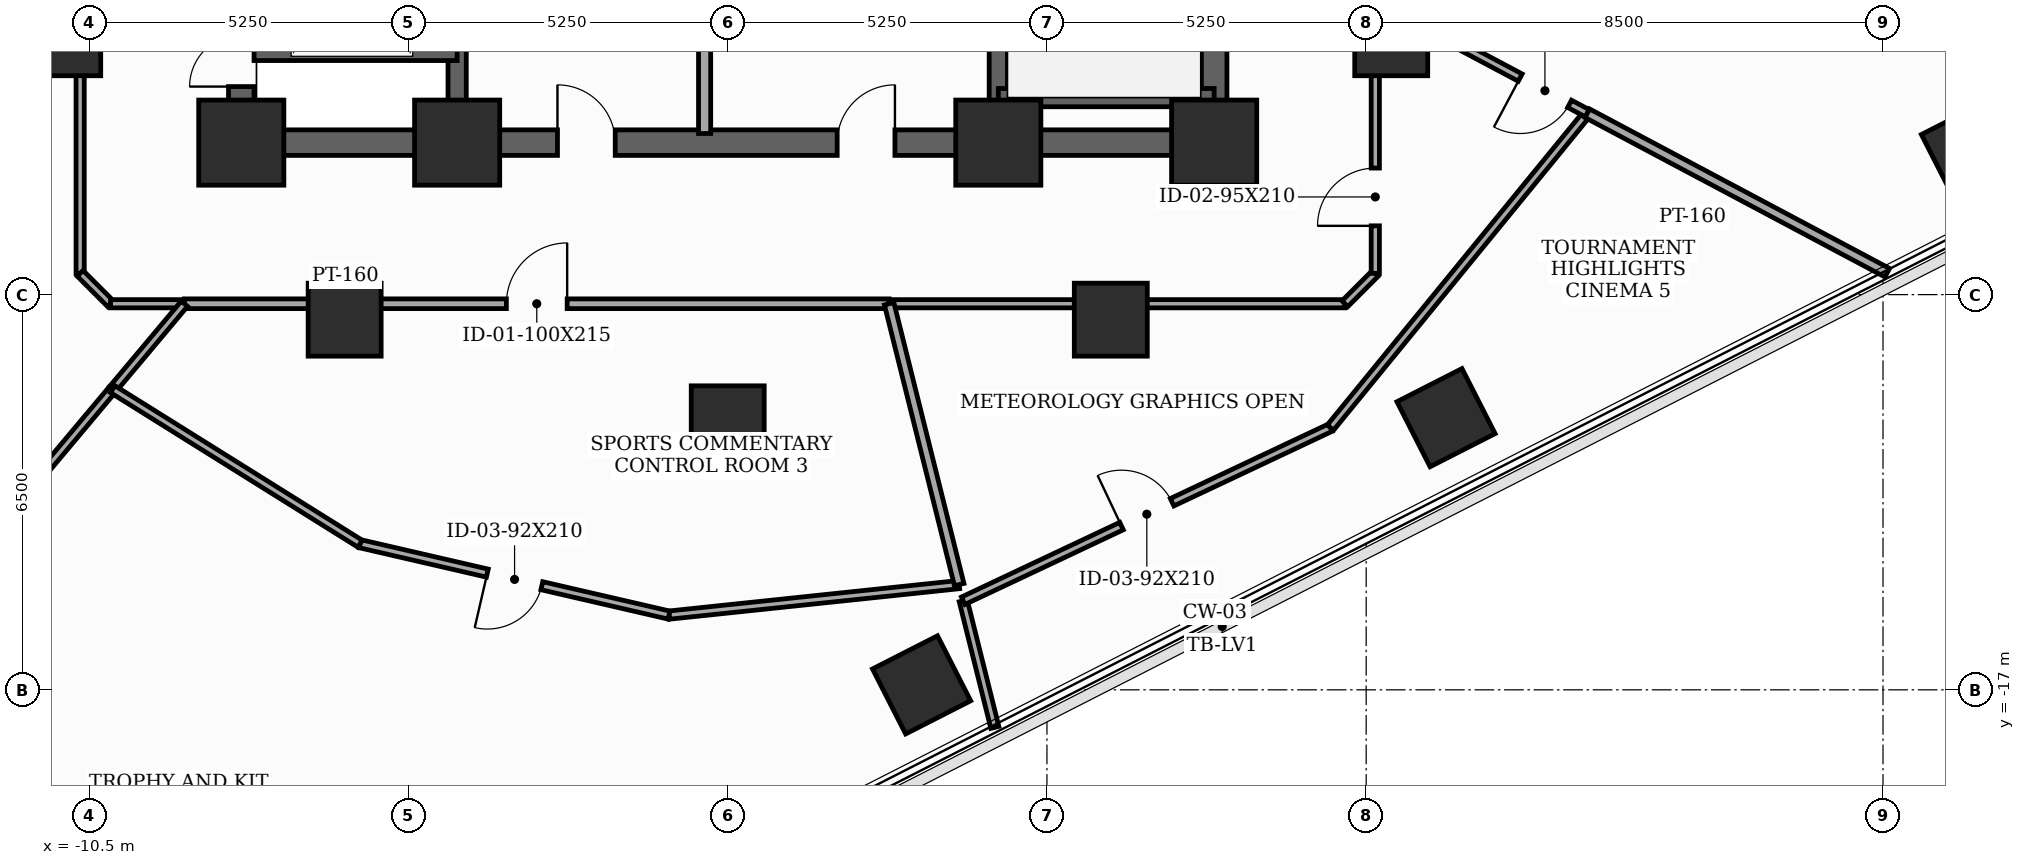
"""IFC4 building model, lengths in metres.
Left out: names, types, materials, properties, quantities, classifications, styles, units other than length and angle.
Written with IfcOpenShell. Run it as: python <this file> out.ifc"""

import sys

from ifc_helpers import new_model, si_unit, direction, frame, frame_2d, origin, origin_2d, place, context, subcontext, project, spatial, rectangle, extrude, element, fill, save


model = new_model("IFC4")
c1 = context("Model", 3, precision=1e-05, world=origin(), true_north=direction((0.0, 1.0)))
c2 = subcontext(c1, "Body", "Model", "MODEL_VIEW")
j1 = project(units=[si_unit("LENGTHUNIT", "METRE"), si_unit("PLANEANGLEUNIT", "RADIAN")], contexts=[c1])
p1 = place(None, origin())
s1 = spatial("IfcSite", under=j1, at=p1, CompositionType="ELEMENT")
p2 = place(p1, origin())
s2 = spatial("IfcBuilding", under=s1, at=p2, CompositionType="ELEMENT")
p3 = place(p2, frame((0.0, 0.0, 127.3)))
s3 = spatial("IfcBuildingStorey", under=s2, at=p3, CompositionType="ELEMENT", Elevation=127.3)
for number, where, z_axis, x_axis in (
    (1, (-8.0, -8.0, 0.0), (0.0, 0.0, 1.0), (1.0, 0.0, 0.0)),
    (2, (-4.45, -8.0, 0.0), (0.0, 0.0, 1.0), (1.0, 0.0, 0.0)),
    (3, (4.45, -8.0, 0.0), (0.0, 0.0, 1.0), (1.0, 0.0, 0.0)),
    (4, (8.0, -8.0, 0.0), (0.0, 0.0, 1.0), (1.0, 0.0, 0.0)),
):
    element("IfcColumn", number, at=place(p3, frame(where, z_axis=z_axis, x_axis=x_axis)), inside=s3, PredefinedType="COLUMN", context=c2, shape_type="SweptSolid", body=[
        extrude(rectangle(XDim=1.4, YDim=1.4, at=origin_2d()), origin(), (0.0, 0.0, 1.0), 3.7),
    ])
for number, where, z_axis, x_axis in (
    (5, (-10.912, -6.3, 0.0), (0.0, 0.0, 1.0), (1.0, 0.0, 0.0)),
    (6, (-6.3, -10.912, 0.0), (0.0, 0.0, 1.0), (1.0, 0.0, 0.0)),
    (7, (0.0, -12.6, 0.0), (0.0, 0.0, 1.0), (1.0, 0.0, 0.0)),
    (8, (6.3, -10.912, 0.0), (0.0, 0.0, 1.0), (1.0, 0.0, 0.0)),
    (9, (10.912, -6.3, 0.0), (0.0, 0.0, 1.0), (1.0, 0.0, 0.0)),
    (10, (3.188, -16.918, 0.0), (0.0, 0.0, 1.0), (0.891, 0.454, 0.0)),
    (11, (11.813, -12.524, 0.0), (0.0, 0.0, 1.0), (0.891, 0.454, 0.0)),
    (12, (20.438, -8.129, 0.0), (0.0, 0.0, 1.0), (0.891, 0.454, 0.0)),
):
    element("IfcColumn", number, at=place(p3, frame(where, z_axis=z_axis, x_axis=x_axis)), inside=s3, PredefinedType="COLUMN", context=c2, shape_type="SweptSolid", body=[
        extrude(rectangle(XDim=1.2, YDim=1.2, at=origin_2d()), origin(), (0.0, 0.0, 1.0), 3.7),
    ])
p4 = place(p3, frame((-8.0, -8.0, 0.0), z_axis=(0.0, 0.0, 1.0), x_axis=(0.0, 1.0, 0.0)))
e13 = element("IfcWall", 13, at=p4, inside=s3, PredefinedType="SHEAR", context=c2, shape_type="SweptSolid", body=[
    extrude(rectangle(XDim=16.0, YDim=0.42, at=frame_2d((8.0, 0.0))), origin(), (0.0, 0.0, 1.0), 3.5),
])
p5 = place(p4, frame((0.922, 0.0, 0.0)))
e14 = element("IfcOpeningElement", 14, at=p5, cuts=e13, PredefinedType="OPENING", context=c2, shape_type="SweptSolid", body=[
    extrude(rectangle(XDim=0.85, YDim=2.02, at=frame_2d((0.425, 1.01))), frame((0.0, 0.22, 0.0), z_axis=(0.0, -1.0, 0.0), x_axis=(1.0, 0.0, 0.0)), (0.0, 0.0, 1.0), 0.44),
])
p6 = place(p4, frame((5.35, 0.0, 0.0)))
e15 = element("IfcOpeningElement", 15, at=p6, cuts=e13, PredefinedType="OPENING", context=c2, shape_type="SweptSolid", body=[
    extrude(rectangle(XDim=1.05, YDim=2.15, at=frame_2d((0.525, 1.075))), frame((0.0, 0.22, 0.0), z_axis=(0.0, -1.0, 0.0), x_axis=(1.0, 0.0, 0.0)), (0.0, 0.0, 1.0), 0.44),
])
p7 = place(p3, frame((8.0, -8.0, 0.0), z_axis=(0.0, 0.0, 1.0), x_axis=(0.0, 1.0, 0.0)))
e16 = element("IfcWall", 16, at=p7, inside=s3, PredefinedType="SHEAR", context=c2, shape_type="SweptSolid", body=[
    extrude(rectangle(XDim=16.0, YDim=0.42, at=frame_2d((8.0, 0.0))), origin(), (0.0, 0.0, 1.0), 3.5),
])
p8 = place(p7, frame((9.6, 0.0, 0.0)))
e17 = element("IfcOpeningElement", 17, at=p8, cuts=e16, PredefinedType="OPENING", context=c2, shape_type="SweptSolid", body=[
    extrude(rectangle(XDim=1.05, YDim=2.15, at=frame_2d((0.525, 1.075))), frame((0.0, 0.22, 0.0), z_axis=(0.0, -1.0, 0.0), x_axis=(1.0, 0.0, 0.0)), (0.0, 0.0, 1.0), 0.44),
])
p9 = place(p7, frame((14.229, 0.0, 0.0)))
e18 = element("IfcOpeningElement", 18, at=p9, cuts=e16, PredefinedType="OPENING", context=c2, shape_type="SweptSolid", body=[
    extrude(rectangle(XDim=0.85, YDim=2.02, at=frame_2d((0.425, 1.01))), frame((0.0, 0.22, 0.0), z_axis=(0.0, -1.0, 0.0), x_axis=(1.0, 0.0, 0.0)), (0.0, 0.0, 1.0), 0.44),
])
p10 = place(p3, frame((-8.0, -8.0, 0.0), z_axis=(0.0, 0.0, 1.0), x_axis=(1.0, 0.0, 0.0)))
e19 = element("IfcWall", 19, at=p10, inside=s3, PredefinedType="SHEAR", context=c2, shape_type="SweptSolid", body=[
    extrude(rectangle(XDim=16.0, YDim=0.42, at=frame_2d((8.0, 0.0))), origin(), (0.0, 0.0, 1.0), 3.5),
])
p11 = place(p10, frame((5.2, 0.0, 0.0)))
e20 = element("IfcOpeningElement", 20, at=p11, cuts=e19, PredefinedType="OPENING", context=c2, shape_type="SweptSolid", body=[
    extrude(rectangle(XDim=0.95, YDim=2.1, at=frame_2d((0.475, 1.05))), frame((0.0, 0.22, 0.0), z_axis=(0.0, -1.0, 0.0), x_axis=(1.0, 0.0, 0.0)), (0.0, 0.0, 1.0), 0.44),
])
p12 = place(p10, frame((9.8, 0.0, 0.0)))
e21 = element("IfcOpeningElement", 21, at=p12, cuts=e19, PredefinedType="OPENING", context=c2, shape_type="SweptSolid", body=[
    extrude(rectangle(XDim=0.95, YDim=2.1, at=frame_2d((0.475, 1.05))), frame((0.0, 0.22, 0.0), z_axis=(0.0, -1.0, 0.0), x_axis=(1.0, 0.0, 0.0)), (0.0, 0.0, 1.0), 0.44),
])
for number, where, z_axis, x_axis in (
    (22, (-4.45, -7.79, 0.0), (0.0, 0.0, 1.0), (0.0, 1.0, 0.0)),
    (23, (4.45, -7.79, 0.0), (0.0, 0.0, 1.0), (0.0, 1.0, 0.0)),
):
    element("IfcWall", number, at=place(p3, frame(where, z_axis=z_axis, x_axis=x_axis)), inside=s3, PredefinedType="SHEAR", context=c2, shape_type="SweptSolid", body=[
        extrude(rectangle(XDim=15.58, YDim=0.3, at=frame_2d((7.79, 0.0))), origin(), (0.0, 0.0, 1.0), 3.5),
    ])
p13 = place(p3, frame((4.45, -7.26, 0.0), z_axis=(0.0, 0.0, 1.0), x_axis=(1.0, 0.0, 0.0)))
e24 = element("IfcWall", 24, at=p13, inside=s3, PredefinedType="SHEAR", context=c2, shape_type="SweptSolid", body=[
    extrude(rectangle(XDim=3.55, YDim=0.3, at=frame_2d((1.775, 0.0))), origin(), (0.0, 0.0, 1.0), 3.5),
])
p14 = place(p3, frame((-7.79, -6.5, 0.0), z_axis=(0.0, 0.0, 1.0), x_axis=(1.0, 0.0, 0.0)))
e25 = element("IfcWall", 25, at=p14, inside=s3, PredefinedType="SHEAR", context=c2, shape_type="SweptSolid", body=[
    extrude(rectangle(XDim=3.34, YDim=0.3, at=frame_2d((1.67, 0.0))), origin(), (0.0, 0.0, 1.0), 3.5),
])
p15 = place(p3, frame((-0.38, -7.85, 0.0), z_axis=(0.0, 0.0, 1.0), x_axis=(0.0, 1.0, 0.0)))
e26 = element("IfcWall", 26, at=p15, inside=s3, PredefinedType="SOLIDWALL", context=c2, shape_type="SweptSolid", body=[
    extrude(rectangle(XDim=2.95, YDim=0.2, at=frame_2d((1.475, 0.0))), origin(), (0.0, 0.0, 1.0), 2.885),
])
p16 = place(p3, frame((-10.65, -2.264, 0.0), z_axis=(0.0, 0.0, 1.0), x_axis=(0.0, -1.0, 0.0)))
e27 = element("IfcWall", 27, at=p16, inside=s3, PredefinedType="PARTITIONING", context=c2, shape_type="SweptSolid", body=[
    extrude(rectangle(XDim=7.886, YDim=0.135, at=frame_2d((3.943, 0.0))), origin(), (0.0, 0.0, 1.0), 2.785),
])
p17 = place(p3, frame((-10.65, -10.15, 0.0), z_axis=(0.0, 0.0, 1.0), x_axis=(0.707106781187, -0.707106781187, 0.0)))
e28 = element("IfcWall", 28, at=p17, inside=s3, PredefinedType="PARTITIONING", context=c2, shape_type="SweptSolid", body=[
    extrude(rectangle(XDim=0.707, YDim=0.135, at=frame_2d((0.354, 0.0))), origin(), (0.0, 0.0, 1.0), 3.5),
])
p18 = place(p3, frame((-10.15, -10.65, 0.0), z_axis=(0.0, 0.0, 1.0), x_axis=(1.0, 0.0, 0.0)))
e29 = element("IfcWall", 29, at=p18, inside=s3, PredefinedType="PARTITIONING", context=c2, shape_type="SweptSolid", body=[
    extrude(rectangle(XDim=1.214, YDim=0.135, at=frame_2d((0.607, 0.0))), origin(), (0.0, 0.0, 1.0), 3.5),
])
p19 = place(p3, frame((-8.936, -10.65, 0.0), z_axis=(0.0, 0.0, 1.0), x_axis=(1.0, 0.0, 0.0)))
e30 = element("IfcWall", 30, at=p19, inside=s3, PredefinedType="PARTITIONING", context=c2, shape_type="SweptSolid", body=[
    extrude(rectangle(XDim=11.591, YDim=0.16, at=frame_2d((5.795, 0.0))), origin(), (0.0, 0.0, 1.0), 2.785),
])
p20 = place(p19, frame((5.295, 0.0, 0.0)))
e31 = element("IfcOpeningElement", 31, at=p20, cuts=e30, PredefinedType="OPENING", context=c2, shape_type="SweptSolid", body=[
    extrude(rectangle(XDim=1.0, YDim=2.15, at=frame_2d((0.5, 1.075))), frame((0.0, 0.09, 0.0), z_axis=(0.0, -1.0, 0.0), x_axis=(1.0, 0.0, 0.0)), (0.0, 0.0, 1.0), 0.18),
])
p21 = place(p3, frame((2.655, -10.65, 0.0), z_axis=(0.0, 0.0, 1.0), x_axis=(1.0, 0.0, 0.0)))
e32 = element("IfcWall", 32, at=p21, inside=s3, PredefinedType="PARTITIONING", context=c2, shape_type="SweptSolid", body=[
    extrude(rectangle(XDim=7.495, YDim=0.135, at=frame_2d((3.748, 0.0))), origin(), (0.0, 0.0, 1.0), 2.785),
])
p22 = place(p3, frame((10.15, -10.65, 0.0), z_axis=(0.0, 0.0, 1.0), x_axis=(0.707106781187, 0.707106781187, 0.0)))
e33 = element("IfcWall", 33, at=p22, inside=s3, PredefinedType="PARTITIONING", context=c2, shape_type="SweptSolid", body=[
    extrude(rectangle(XDim=0.707, YDim=0.135, at=frame_2d((0.354, 0.0))), origin(), (0.0, 0.0, 1.0), 3.5),
])
p23 = place(p3, frame((10.65, -10.15, 0.0), z_axis=(0.0, 0.0, 1.0), x_axis=(0.0, 1.0, 0.0)))
e34 = element("IfcWall", 34, at=p23, inside=s3, PredefinedType="PARTITIONING", context=c2, shape_type="SweptSolid", body=[
    extrude(rectangle(XDim=4.487, YDim=0.135, at=frame_2d((2.243, 0.0))), origin(), (0.0, 0.0, 1.0), 2.785),
])
p24 = place(p23, frame((0.781, 0.0, 0.0)))
e35 = element("IfcOpeningElement", 35, at=p24, cuts=e34, PredefinedType="OPENING", context=c2, shape_type="SweptSolid", body=[
    extrude(rectangle(XDim=0.95, YDim=2.1, at=frame_2d((0.475, 1.05))), frame((0.0, 0.077, 0.0), z_axis=(0.0, -1.0, 0.0), x_axis=(1.0, 0.0, 0.0)), (0.0, 0.0, 1.0), 0.155),
])
p25 = place(p3, frame((-18.896, -22.52, 0.0), z_axis=(0.0, 0.0, 1.0), x_axis=(0.642815636807, 0.766020924698, 0.0)))
e36 = element("IfcWall", 36, at=p25, inside=s3, PredefinedType="PARTITIONING", context=c2, shape_type="SweptSolid", body=[
    extrude(rectangle(XDim=13.661, YDim=0.135, at=frame_2d((6.831, 0.0))), origin(), (0.0, 0.0, 1.0), 2.985),
])
p26 = place(p3, frame((-10.115, -12.055, 0.0), z_axis=(0.0, 0.0, 1.0), x_axis=(0.64278617419, 0.766045647642, 0.0)))
e37 = element("IfcWall", 37, at=p26, inside=s3, PredefinedType="PARTITIONING", context=c2, shape_type="SweptSolid", body=[
    extrude(rectangle(XDim=1.834, YDim=0.135, at=frame_2d((0.917, 0.0))), origin(), (0.0, 0.0, 1.0), 3.5),
])
p27 = place(p3, frame((3.807, -15.269, 0.0), z_axis=(0.0, 0.0, 1.0), x_axis=(-0.994513256503, -0.104610623932, 0.0)))
e38 = element("IfcWall", 38, at=p27, inside=s3, PredefinedType="PARTITIONING", context=c2, shape_type="SweptSolid", body=[
    extrude(rectangle(XDim=4.798, YDim=0.135, at=frame_2d((2.399, 0.0))), origin(), (0.0, 0.0, 1.0), 2.875),
])
p28 = place(p3, frame((-0.965, -15.771, 0.0), z_axis=(0.0, 0.0, 1.0), x_axis=(-0.974324872008, 0.225146716135, 0.0)))
e39 = element("IfcWall", 39, at=p28, inside=s3, PredefinedType="PARTITIONING", context=c2, shape_type="SweptSolid", body=[
    extrude(rectangle(XDim=5.215, YDim=0.135, at=frame_2d((2.607, 0.0))), origin(), (0.0, 0.0, 1.0), 2.885),
])
p29 = place(p28, frame((2.147, 0.0, 0.0)))
e40 = element("IfcOpeningElement", 40, at=p29, cuts=e39, PredefinedType="OPENING", context=c2, shape_type="SweptSolid", body=[
    extrude(rectangle(XDim=0.92, YDim=2.1, at=frame_2d((0.46, 1.05))), frame((0.0, 0.077, 0.0), z_axis=(0.0, -1.0, 0.0), x_axis=(1.0, 0.0, 0.0)), (0.0, 0.0, 1.0), 0.155),
])
p30 = place(p3, frame((-6.046, -14.597, 0.0), z_axis=(0.0, 0.0, 1.0), x_axis=(-0.848109776096, 0.529820542912, 0.0)))
e41 = element("IfcWall", 41, at=p30, inside=s3, PredefinedType="PARTITIONING", context=c2, shape_type="SweptSolid", body=[
    extrude(rectangle(XDim=4.798, YDim=0.135, at=frame_2d((2.399, 0.0))), origin(), (0.0, 0.0, 1.0), 3.5),
])
p31 = place(p3, frame((4.393, -17.618, 0.0), z_axis=(0.0, 0.0, 1.0), x_axis=(-0.242107483306, 0.970249435211, 0.0)))
e42 = element("IfcWall", 42, at=p31, inside=s3, PredefinedType="PARTITIONING", context=c2, shape_type="SweptSolid", body=[
    extrude(rectangle(XDim=2.147, YDim=0.135, at=frame_2d((1.073, 0.0))), origin(), (0.0, 0.0, 1.0), 2.975),
])
p32 = place(p3, frame((3.807, -15.269, 0.0), z_axis=(0.0, 0.0, 1.0), x_axis=(-0.241956377954, 0.970287128209, 0.0)))
e43 = element("IfcWall", 43, at=p32, inside=s3, PredefinedType="PARTITIONING", context=c2, shape_type="SweptSolid", body=[
    extrude(rectangle(XDim=4.76, YDim=0.16, at=frame_2d((2.38, 0.0))), origin(), (0.0, 0.0, 1.0), 2.785),
])
p33 = place(p3, frame((3.873, -15.535, 0.0), z_axis=(0.0, 0.0, 1.0), x_axis=(0.904472849066, 0.426531200855, 0.0)))
e44 = element("IfcWall", 44, at=p33, inside=s3, PredefinedType="PARTITIONING", context=c2, shape_type="SweptSolid", body=[
    extrude(rectangle(XDim=6.677, YDim=0.135, at=frame_2d((3.338, 0.0))), origin(), (0.0, 0.0, 1.0), 3.49),
])
p34 = place(p33, frame((2.878, 0.0, 0.0)))
e45 = element("IfcOpeningElement", 45, at=p34, cuts=e44, PredefinedType="OPENING", context=c2, shape_type="SweptSolid", body=[
    extrude(rectangle(XDim=0.92, YDim=2.1, at=frame_2d((0.46, 1.05))), frame((0.0, 0.077, 0.0), z_axis=(0.0, -1.0, 0.0), x_axis=(1.0, 0.0, 0.0)), (0.0, 0.0, 1.0), 0.155),
])
p35 = place(p3, frame((9.912, -12.687, 0.0), z_axis=(0.0, 0.0, 1.0), x_axis=(0.632781686385, 0.774330250846, 0.0)))
e46 = element("IfcWall", 46, at=p35, inside=s3, PredefinedType="PARTITIONING", context=c2, shape_type="SweptSolid", body=[
    extrude(rectangle(XDim=6.677, YDim=0.135, at=frame_2d((3.338, 0.0))), origin(), (0.0, 0.0, 1.0), 2.885),
])
p36 = place(p3, frame((14.137, -7.517, 0.0), z_axis=(0.0, 0.0, 1.0), x_axis=(-0.882957991608, 0.46945200506, 0.0)))
e47 = element("IfcWall", 47, at=p36, inside=s3, PredefinedType="PARTITIONING", context=c2, shape_type="SweptSolid", body=[
    extrude(rectangle(XDim=3.949, YDim=0.135, at=frame_2d((1.975, 0.0))), origin(), (0.0, 0.0, 1.0), 2.785),
])
p37 = place(p36, frame((0.33, 0.0, 0.0)))
e48 = element("IfcOpeningElement", 48, at=p37, cuts=e47, PredefinedType="OPENING", context=c2, shape_type="SweptSolid", body=[
    extrude(rectangle(XDim=0.92, YDim=2.1, at=frame_2d((0.46, 1.05))), frame((0.0, 0.077, 0.0), z_axis=(0.0, -1.0, 0.0), x_axis=(1.0, 0.0, 0.0)), (0.0, 0.0, 1.0), 0.155),
])
p38 = place(p3, frame((19.07, -10.14, 0.0), z_axis=(0.0, 0.0, 1.0), x_axis=(-0.882959500857, 0.469449166413, 0.0)))
e49 = element("IfcWall", 49, at=p38, inside=s3, PredefinedType="PARTITIONING", context=c2, shape_type="SweptSolid", body=[
    extrude(rectangle(XDim=5.586, YDim=0.16, at=frame_2d((2.793, 0.0))), origin(), (0.0, 0.0, 1.0), 2.985),
])
p39 = place(p5, origin())
e50 = element("IfcDoor", 50, at=p39, inside=s3, OperationType="SINGLE_SWING_LEFT", PredefinedType="TRAPDOOR", context=c2, shape_type="SweptSolid", body=[
    extrude(rectangle(XDim=0.85, YDim=2.02, at=frame_2d((0.425, 1.01))), frame((0.0, 0.025, 0.0), z_axis=(0.0, -1.0, 0.0), x_axis=(1.0, 0.0, 0.0)), (0.0, 0.0, 1.0), 0.05),
])
fill(e14, e50)
p40 = place(p11, origin())
e51 = element("IfcDoor", 51, at=p40, inside=s3, OperationType="SINGLE_SWING_LEFT", PredefinedType="DOOR", context=c2, shape_type="SweptSolid", body=[
    extrude(rectangle(XDim=0.95, YDim=2.1, at=frame_2d((0.475, 1.05))), frame((0.0, 0.025, 0.0), z_axis=(0.0, -1.0, 0.0), x_axis=(1.0, 0.0, 0.0)), (0.0, 0.0, 1.0), 0.05),
])
fill(e20, e51)
p41 = place(p12, origin())
e52 = element("IfcDoor", 52, at=p41, inside=s3, OperationType="SINGLE_SWING_RIGHT", PredefinedType="DOOR", context=c2, shape_type="SweptSolid", body=[
    extrude(rectangle(XDim=0.95, YDim=2.1, at=frame_2d((0.475, 1.05))), frame((0.0, 0.025, 0.0), z_axis=(0.0, -1.0, 0.0), x_axis=(1.0, 0.0, 0.0)), (0.0, 0.0, 1.0), 0.05),
])
fill(e21, e52)
p42 = place(p20, origin())
e53 = element("IfcDoor", 53, at=p42, inside=s3, OperationType="SINGLE_SWING_RIGHT", PredefinedType="DOOR", context=c2, shape_type="SweptSolid", body=[
    extrude(rectangle(XDim=1.0, YDim=2.15, at=frame_2d((0.5, 1.075))), frame((0.0, 0.025, 0.0), z_axis=(0.0, -1.0, 0.0), x_axis=(1.0, 0.0, 0.0)), (0.0, 0.0, 1.0), 0.05),
])
fill(e31, e53)
p43 = place(p24, origin())
e54 = element("IfcDoor", 54, at=p43, inside=s3, OperationType="SINGLE_SWING_LEFT", PredefinedType="DOOR", context=c2, shape_type="SweptSolid", body=[
    extrude(rectangle(XDim=0.95, YDim=2.1, at=frame_2d((0.475, 1.05))), frame((0.0, 0.025, 0.0), z_axis=(0.0, -1.0, 0.0), x_axis=(1.0, 0.0, 0.0)), (0.0, 0.0, 1.0), 0.05),
])
fill(e35, e54)
p44 = place(p29, origin())
e55 = element("IfcDoor", 55, at=p44, inside=s3, OperationType="SINGLE_SWING_RIGHT", PredefinedType="DOOR", context=c2, shape_type="SweptSolid", body=[
    extrude(rectangle(XDim=0.92, YDim=2.1, at=frame_2d((0.46, 1.05))), frame((0.0, 0.025, 0.0), z_axis=(0.0, -1.0, 0.0), x_axis=(1.0, 0.0, 0.0)), (0.0, 0.0, 1.0), 0.05),
])
fill(e40, e55)
p45 = place(p34, origin())
e56 = element("IfcDoor", 56, at=p45, inside=s3, OperationType="SINGLE_SWING_LEFT", PredefinedType="DOOR", context=c2, shape_type="SweptSolid", body=[
    extrude(rectangle(XDim=0.92, YDim=2.1, at=frame_2d((0.46, 1.05))), frame((0.0, 0.025, 0.0), z_axis=(0.0, -1.0, 0.0), x_axis=(1.0, 0.0, 0.0)), (0.0, 0.0, 1.0), 0.05),
])
fill(e45, e56)
p46 = place(p37, origin())
e57 = element("IfcDoor", 57, at=p46, inside=s3, OperationType="SINGLE_SWING_RIGHT", PredefinedType="DOOR", context=c2, shape_type="SweptSolid", body=[
    extrude(rectangle(XDim=0.92, YDim=2.1, at=frame_2d((0.46, 1.05))), frame((0.0, 0.025, 0.0), z_axis=(0.0, -1.0, 0.0), x_axis=(1.0, 0.0, 0.0)), (0.0, 0.0, 1.0), 0.05),
])
fill(e48, e57)
save(model, sys.argv[1])
